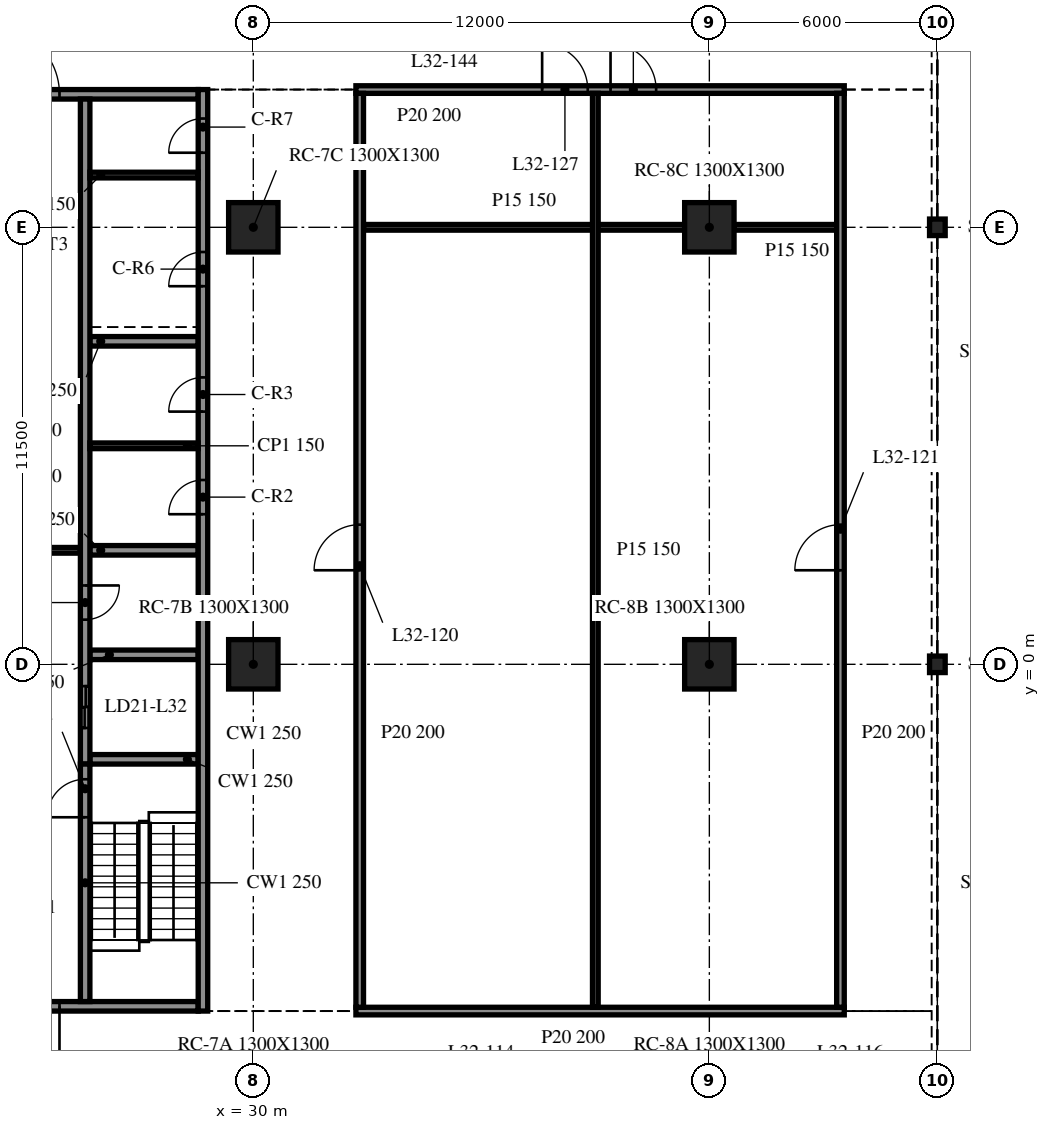
"""IFC4 building model, lengths in metres.
Left out: names, types, materials, properties, quantities, classifications, styles, units other than length and angle.
Written with IfcOpenShell. Run it as: python <this file> out.ifc"""

import sys

from ifc_helpers import new_model, si_unit, direction, frame, frame_2d, origin, origin_2d, place, context, subcontext, project, spatial, rectangle, i_section, extrude, element, fill, save


model = new_model("IFC4")
c1 = context("Model", 3, precision=1e-05, world=origin(), true_north=direction((0.0, 1.0)))
c2 = subcontext(c1, "Body", "Model", "MODEL_VIEW")
j1 = project(units=[si_unit("LENGTHUNIT", "METRE"), si_unit("PLANEANGLEUNIT", "RADIAN")], contexts=[c1])
p1 = place(None, origin())
s1 = spatial("IfcSite", under=j1, at=p1, CompositionType="ELEMENT")
p2 = place(p1, origin())
s2 = spatial("IfcBuilding", under=s1, at=p2, CompositionType="ELEMENT")
p3 = place(p2, frame((0.0, 0.0, 138.4)))
s3 = spatial("IfcBuildingStorey", under=s2, at=p3, CompositionType="ELEMENT", Elevation=138.4)
for number, where, z_axis, x_axis in (
    (1, (30.0, 0.0, -0.34), (0.0, 0.0, 1.0), (1.0, 0.0, 0.0)),
    (2, (30.0, 11.5, -0.34), (0.0, 0.0, 1.0), (1.0, 0.0, 0.0)),
    (3, (42.0, 0.0, -0.34), (0.0, 0.0, 1.0), (1.0, 0.0, 0.0)),
    (4, (42.0, 11.5, -0.34), (0.0, 0.0, 1.0), (1.0, 0.0, 0.0)),
):
    element("IfcColumn", number, at=place(p3, frame(where, z_axis=z_axis, x_axis=x_axis)), inside=s3, PredefinedType="COLUMN", context=c2, shape_type="SweptSolid", body=[
        extrude(rectangle(XDim=1.3, YDim=1.3, at=origin_2d()), origin(), (0.0, 0.0, 1.0), 4.1),
    ])
for number, where, z_axis, x_axis in (
    (5, (48.0, 0.0, -0.34), (0.0, 0.0, 1.0), (1.0, 0.0, 0.0)),
    (6, (48.0, 11.5, -0.34), (0.0, 0.0, 1.0), (1.0, 0.0, 0.0)),
):
    element("IfcColumn", number, at=place(p3, frame(where, z_axis=z_axis, x_axis=x_axis)), inside=s3, PredefinedType="COLUMN", context=c2, shape_type="SweptSolid", body=[
        extrude(i_section(OverallWidth=0.412, OverallDepth=0.434, WebThickness=0.036, FlangeThickness=0.057, at=origin_2d()), origin(), (0.0, 0.0, 1.0), 4.1),
    ])
p4 = place(p3, frame((28.675, -9.125, 0.0), z_axis=(0.0, 0.0, 1.0), x_axis=(0.0, 1.0, 0.0)))
e7 = element("IfcWall", 7, at=p4, inside=s3, PredefinedType="SOLIDWALL", context=c2, shape_type="SweptSolid", body=[
    extrude(rectangle(XDim=24.25, YDim=0.25, at=frame_2d((12.125, 0.0))), origin(), (0.0, 0.0, 1.0), 3.76),
])
p5 = place(p4, frame((13.075, 0.0, 0.0)))
e8 = element("IfcOpeningElement", 8, at=p5, cuts=e7, PredefinedType="OPENING", context=c2, shape_type="SweptSolid", body=[
    extrude(rectangle(XDim=0.9, YDim=2.1, at=frame_2d((0.45, 1.05))), frame((0.0, 0.135, 0.0), z_axis=(0.0, -1.0, 0.0), x_axis=(1.0, 0.0, 0.0)), (0.0, 0.0, 1.0), 0.27),
])
p6 = place(p4, frame((15.775, 0.0, 0.0)))
e9 = element("IfcOpeningElement", 9, at=p6, cuts=e7, PredefinedType="OPENING", context=c2, shape_type="SweptSolid", body=[
    extrude(rectangle(XDim=0.9, YDim=2.1, at=frame_2d((0.45, 1.05))), frame((0.0, 0.135, 0.0), z_axis=(0.0, -1.0, 0.0), x_axis=(1.0, 0.0, 0.0)), (0.0, 0.0, 1.0), 0.27),
])
p7 = place(p4, frame((19.075, 0.0, 0.0)))
e10 = element("IfcOpeningElement", 10, at=p7, cuts=e7, PredefinedType="OPENING", context=c2, shape_type="SweptSolid", body=[
    extrude(rectangle(XDim=0.9, YDim=2.1, at=frame_2d((0.45, 1.05))), frame((0.0, 0.135, 0.0), z_axis=(0.0, -1.0, 0.0), x_axis=(1.0, 0.0, 0.0)), (0.0, 0.0, 1.0), 0.27),
])
p8 = place(p4, frame((22.587, 0.0, 0.0)))
e11 = element("IfcOpeningElement", 11, at=p8, cuts=e7, PredefinedType="OPENING", context=c2, shape_type="SweptSolid", body=[
    extrude(rectangle(XDim=0.9, YDim=2.1, at=frame_2d((0.45, 1.05))), frame((0.0, 0.135, 0.0), z_axis=(0.0, -1.0, 0.0), x_axis=(1.0, 0.0, 0.0)), (0.0, 0.0, 1.0), 0.27),
])
p9 = place(p3, frame((28.55, -9.0, 0.0), z_axis=(0.0, 0.0, 1.0), x_axis=(-1.0, 0.0, 0.0)))
e12 = element("IfcWall", 12, at=p9, inside=s3, PredefinedType="SOLIDWALL", context=c2, shape_type="SweptSolid", body=[
    extrude(rectangle(XDim=9.1, YDim=0.25, at=frame_2d((4.55, 0.0))), origin(), (0.0, 0.0, 1.0), 3.76),
])
p10 = place(p9, frame((3.65, 0.0, 0.0)))
e13 = element("IfcOpeningElement", 13, at=p10, cuts=e12, PredefinedType="OPENING", context=c2, shape_type="SweptSolid", body=[
    extrude(rectangle(XDim=1.8, YDim=2.1, at=frame_2d((0.9, 1.05))), frame((0.0, 0.135, 0.0), z_axis=(0.0, -1.0, 0.0), x_axis=(1.0, 0.0, 0.0)), (0.0, 0.0, 1.0), 0.27),
])
p11 = place(p3, frame((19.45, 15.0, 0.0), z_axis=(0.0, 0.0, 1.0), x_axis=(1.0, 0.0, 0.0)))
e14 = element("IfcWall", 14, at=p11, inside=s3, PredefinedType="SOLIDWALL", context=c2, shape_type="SweptSolid", body=[
    extrude(rectangle(XDim=9.1, YDim=0.25, at=frame_2d((4.55, 0.0))), origin(), (0.0, 0.0, 1.0), 3.76),
])
p12 = place(p11, frame((3.65, 0.0, 0.0)))
e15 = element("IfcOpeningElement", 15, at=p12, cuts=e14, PredefinedType="OPENING", context=c2, shape_type="SweptSolid", body=[
    extrude(rectangle(XDim=1.8, YDim=2.1, at=frame_2d((0.9, 1.05))), frame((0.0, 0.135, 0.0), z_axis=(0.0, -1.0, 0.0), x_axis=(1.0, 0.0, 0.0)), (0.0, 0.0, 1.0), 0.27),
])
p13 = place(p3, frame((25.575, -8.875, 0.0), z_axis=(0.0, 0.0, 1.0), x_axis=(0.0, 1.0, 0.0)))
e16 = element("IfcWall", 16, at=p13, inside=s3, PredefinedType="SOLIDWALL", context=c2, shape_type="SweptSolid", body=[
    extrude(rectangle(XDim=6.25, YDim=0.25, at=frame_2d((3.125, 0.0))), origin(), (0.0, 0.0, 1.0), 3.76),
])
p14 = place(p13, frame((4.85, 0.0, 0.0)))
e17 = element("IfcOpeningElement", 17, at=p14, cuts=e16, PredefinedType="OPENING", context=c2, shape_type="SweptSolid", body=[
    extrude(rectangle(XDim=1.0, YDim=2.1, at=frame_2d((0.5, 1.05))), frame((0.0, 0.135, 0.0), z_axis=(0.0, -1.0, 0.0), x_axis=(1.0, 0.0, 0.0)), (0.0, 0.0, 1.0), 0.27),
])
p15 = place(p3, frame((25.575, 14.875, 0.0), z_axis=(0.0, 0.0, 1.0), x_axis=(0.0, -1.0, 0.0)))
e18 = element("IfcWall", 18, at=p15, inside=s3, PredefinedType="SOLIDWALL", context=c2, shape_type="SweptSolid", body=[
    extrude(rectangle(XDim=17.5, YDim=0.25, at=frame_2d((8.75, 0.0))), origin(), (0.0, 0.0, 1.0), 3.76),
])
p16 = place(p15, frame((15.45, 0.0, 0.0)))
e19 = element("IfcOpeningElement", 19, at=p16, cuts=e18, PredefinedType="OPENING", context=c2, shape_type="SweptSolid", body=[
    extrude(rectangle(XDim=1.1, YDim=2.1, at=frame_2d((0.55, 1.05))), frame((0.0, 0.135, 0.0), z_axis=(0.0, -1.0, 0.0), x_axis=(1.0, 0.0, 0.0)), (0.0, 0.0, 1.0), 0.27),
])
p17 = place(p15, frame((12.8, 0.0, 0.0)))
e20 = element("IfcOpeningElement", 20, at=p17, cuts=e18, PredefinedType="OPENING", context=c2, shape_type="SweptSolid", body=[
    extrude(rectangle(XDim=0.9, YDim=2.1, at=frame_2d((0.45, 1.05))), frame((0.0, 0.135, 0.0), z_axis=(0.0, -1.0, 0.0), x_axis=(1.0, 0.0, 0.0)), (0.0, 0.0, 1.0), 0.27),
])
for number, where, z_axis, x_axis in (
    (21, (25.7, -2.5, 0.0), (0.0, 0.0, 1.0), (1.0, 0.0, 0.0)),
    (22, (25.7, 0.25, 0.0), (0.0, 0.0, 1.0), (1.0, 0.0, 0.0)),
    (23, (25.7, 3.0, 0.0), (0.0, 0.0, 1.0), (1.0, 0.0, 0.0)),
    (24, (25.7, 8.5, 0.0), (0.0, 0.0, 1.0), (1.0, 0.0, 0.0)),
):
    element("IfcWall", number, at=place(p3, frame(where, z_axis=z_axis, x_axis=x_axis)), inside=s3, PredefinedType="SOLIDWALL", context=c2, shape_type="SweptSolid", body=[
        extrude(rectangle(XDim=2.85, YDim=0.25, at=frame_2d((1.425, 0.0))), origin(), (0.0, 0.0, 1.0), 3.76),
    ])
p18 = place(p3, frame((22.55, 3.0, 0.0), z_axis=(0.0, 0.0, 1.0), x_axis=(1.0, 0.0, 0.0)))
e25 = element("IfcWall", 25, at=p18, inside=s3, PredefinedType="PARTITIONING", context=c2, shape_type="SweptSolid", body=[
    extrude(rectangle(XDim=2.9, YDim=0.15, at=frame_2d((1.45, 0.0))), origin(), (0.0, 0.0, 1.0), 3.76),
])
for number, where, z_axis, x_axis in (
    (26, (25.7, 5.75, 0.0), (0.0, 0.0, 1.0), (1.0, 0.0, 0.0)),
    (27, (25.7, 12.875, 0.0), (0.0, 0.0, 1.0), (1.0, 0.0, 0.0)),
):
    element("IfcWall", number, at=place(p3, frame(where, z_axis=z_axis, x_axis=x_axis)), inside=s3, PredefinedType="PARTITIONING", context=c2, shape_type="SweptSolid", body=[
        extrude(rectangle(XDim=2.85, YDim=0.15, at=frame_2d((1.425, 0.0))), origin(), (0.0, 0.0, 1.0), 3.76),
    ])
p19 = place(p3, frame((32.7, -9.125, 0.0), z_axis=(0.0, 0.0, 1.0), x_axis=(1.0, 0.0, 0.0)))
e28 = element("IfcWall", 28, at=p19, inside=s3, PredefinedType="PARTITIONING", context=c2, shape_type="SweptSolid", body=[
    extrude(rectangle(XDim=12.85, YDim=0.2, at=frame_2d((6.425, 0.0))), origin(), (0.0, 0.0, 1.0), 3.76),
])
p20 = place(p3, frame((32.9, 11.5, 0.0), z_axis=(0.0, 0.0, 1.0), x_axis=(1.0, 0.0, 0.0)))
e29 = element("IfcWall", 29, at=p20, inside=s3, PredefinedType="PARTITIONING", context=c2, shape_type="SweptSolid", body=[
    extrude(rectangle(XDim=8.45, YDim=0.15, at=frame_2d((4.225, 0.0))), origin(), (0.0, 0.0, 1.0), 3.76),
])
p21 = place(p3, frame((42.65, 11.5, 0.0), z_axis=(0.0, 0.0, 1.0), x_axis=(1.0, 0.0, 0.0)))
e30 = element("IfcWall", 30, at=p21, inside=s3, PredefinedType="PARTITIONING", context=c2, shape_type="SweptSolid", body=[
    extrude(rectangle(XDim=2.7, YDim=0.15, at=frame_2d((1.35, 0.0))), origin(), (0.0, 0.0, 1.0), 3.76),
])
p22 = place(p3, frame((32.7, 15.125, 0.0), z_axis=(0.0, 0.0, 1.0), x_axis=(1.0, 0.0, 0.0)))
e31 = element("IfcWall", 31, at=p22, inside=s3, PredefinedType="PARTITIONING", context=c2, shape_type="SweptSolid", body=[
    extrude(rectangle(XDim=12.85, YDim=0.2, at=frame_2d((6.425, 0.0))), origin(), (0.0, 0.0, 1.0), 3.76),
])
p23 = place(p22, frame((4.9, 0.0, 0.0)))
e32 = element("IfcOpeningElement", 32, at=p23, cuts=e31, PredefinedType="OPENING", context=c2, shape_type="SweptSolid", body=[
    extrude(rectangle(XDim=1.2, YDim=2.1, at=frame_2d((0.6, 1.05))), frame((0.0, 0.11, 0.0), z_axis=(0.0, -1.0, 0.0), x_axis=(1.0, 0.0, 0.0)), (0.0, 0.0, 1.0), 0.22),
])
p24 = place(p22, frame((6.7, 0.0, 0.0)))
e33 = element("IfcOpeningElement", 33, at=p24, cuts=e31, PredefinedType="OPENING", context=c2, shape_type="SweptSolid", body=[
    extrude(rectangle(XDim=1.2, YDim=2.1, at=frame_2d((0.6, 1.05))), frame((0.0, 0.11, 0.0), z_axis=(0.0, -1.0, 0.0), x_axis=(1.0, 0.0, 0.0)), (0.0, 0.0, 1.0), 0.22),
])
p25 = place(p3, frame((32.8, -9.025, 0.0), z_axis=(0.0, 0.0, 1.0), x_axis=(0.0, 1.0, 0.0)))
e34 = element("IfcWall", 34, at=p25, inside=s3, PredefinedType="PARTITIONING", context=c2, shape_type="SweptSolid", body=[
    extrude(rectangle(XDim=24.05, YDim=0.2, at=frame_2d((12.025, 0.0))), origin(), (0.0, 0.0, 1.0), 3.76),
])
p26 = place(p25, frame((11.5, 0.0, 0.0)))
e35 = element("IfcOpeningElement", 35, at=p26, cuts=e34, PredefinedType="OPENING", context=c2, shape_type="SweptSolid", body=[
    extrude(rectangle(XDim=1.2, YDim=2.1, at=frame_2d((0.6, 1.05))), frame((0.0, 0.11, 0.0), z_axis=(0.0, -1.0, 0.0), x_axis=(1.0, 0.0, 0.0)), (0.0, 0.0, 1.0), 0.22),
])
p27 = place(p3, frame((39.0, -9.025, 0.0), z_axis=(0.0, 0.0, 1.0), x_axis=(0.0, 1.0, 0.0)))
e36 = element("IfcWall", 36, at=p27, inside=s3, PredefinedType="PARTITIONING", context=c2, shape_type="SweptSolid", body=[
    extrude(rectangle(XDim=24.05, YDim=0.15, at=frame_2d((12.025, 0.0))), origin(), (0.0, 0.0, 1.0), 3.76),
])
p28 = place(p3, frame((45.45, -9.025, 0.0), z_axis=(0.0, 0.0, 1.0), x_axis=(0.0, 1.0, 0.0)))
e37 = element("IfcWall", 37, at=p28, inside=s3, PredefinedType="PARTITIONING", context=c2, shape_type="SweptSolid", body=[
    extrude(rectangle(XDim=24.05, YDim=0.2, at=frame_2d((12.025, 0.0))), origin(), (0.0, 0.0, 1.0), 3.76),
])
p29 = place(p28, frame((11.5, 0.0, 0.0)))
e38 = element("IfcOpeningElement", 38, at=p29, cuts=e37, PredefinedType="OPENING", context=c2, shape_type="SweptSolid", body=[
    extrude(rectangle(XDim=1.2, YDim=2.1, at=frame_2d((0.6, 1.05))), frame((0.0, 0.11, 0.0), z_axis=(0.0, -1.0, 0.0), x_axis=(1.0, 0.0, 0.0)), (0.0, 0.0, 1.0), 0.22),
])
p30 = place(p10, origin())
e39 = element("IfcDoor", 39, at=p30, inside=s3, OperationType="DOUBLE_DOOR_SINGLE_SWING", PredefinedType="DOOR", context=c2, shape_type="SweptSolid", body=[
    extrude(rectangle(XDim=1.8, YDim=2.1, at=frame_2d((0.9, 1.05))), frame((0.0, 0.025, 0.0), z_axis=(0.0, -1.0, 0.0), x_axis=(1.0, 0.0, 0.0)), (0.0, 0.0, 1.0), 0.05),
])
fill(e13, e39)
p31 = place(p12, origin())
e40 = element("IfcDoor", 40, at=p31, inside=s3, OperationType="DOUBLE_DOOR_SINGLE_SWING", PredefinedType="DOOR", context=c2, shape_type="SweptSolid", body=[
    extrude(rectangle(XDim=1.8, YDim=2.1, at=frame_2d((0.9, 1.05))), frame((0.0, 0.025, 0.0), z_axis=(0.0, -1.0, 0.0), x_axis=(1.0, 0.0, 0.0)), (0.0, 0.0, 1.0), 0.05),
])
fill(e15, e40)
p32 = place(p16, origin())
e41 = element("IfcDoor", 41, at=p32, inside=s3, OperationType="DOUBLE_DOOR_SLIDING", PredefinedType="DOOR", context=c2, shape_type="SweptSolid", body=[
    extrude(rectangle(XDim=1.1, YDim=2.1, at=frame_2d((0.55, 1.05))), frame((0.0, 0.025, 0.0), z_axis=(0.0, -1.0, 0.0), x_axis=(1.0, 0.0, 0.0)), (0.0, 0.0, 1.0), 0.05),
])
fill(e19, e41)
p33 = place(p17, origin())
e42 = element("IfcDoor", 42, at=p33, inside=s3, OperationType="SINGLE_SWING_LEFT", PredefinedType="DOOR", context=c2, shape_type="SweptSolid", body=[
    extrude(rectangle(XDim=0.9, YDim=2.1, at=frame_2d((0.45, 1.05))), frame((0.0, 0.025, 0.0), z_axis=(0.0, -1.0, 0.0), x_axis=(1.0, 0.0, 0.0)), (0.0, 0.0, 1.0), 0.05),
])
fill(e20, e42)
p34 = place(p5, origin())
e43 = element("IfcDoor", 43, at=p34, inside=s3, OperationType="SINGLE_SWING_RIGHT", PredefinedType="DOOR", context=c2, shape_type="SweptSolid", body=[
    extrude(rectangle(XDim=0.9, YDim=2.1, at=frame_2d((0.45, 1.05))), frame((0.0, 0.025, 0.0), z_axis=(0.0, -1.0, 0.0), x_axis=(1.0, 0.0, 0.0)), (0.0, 0.0, 1.0), 0.05),
])
fill(e8, e43)
p35 = place(p6, origin())
e44 = element("IfcDoor", 44, at=p35, inside=s3, OperationType="SINGLE_SWING_LEFT", PredefinedType="DOOR", context=c2, shape_type="SweptSolid", body=[
    extrude(rectangle(XDim=0.9, YDim=2.1, at=frame_2d((0.45, 1.05))), frame((0.0, 0.025, 0.0), z_axis=(0.0, -1.0, 0.0), x_axis=(1.0, 0.0, 0.0)), (0.0, 0.0, 1.0), 0.05),
])
fill(e9, e44)
p36 = place(p7, origin())
e45 = element("IfcDoor", 45, at=p36, inside=s3, OperationType="SINGLE_SWING_RIGHT", PredefinedType="DOOR", context=c2, shape_type="SweptSolid", body=[
    extrude(rectangle(XDim=0.9, YDim=2.1, at=frame_2d((0.45, 1.05))), frame((0.0, 0.025, 0.0), z_axis=(0.0, -1.0, 0.0), x_axis=(1.0, 0.0, 0.0)), (0.0, 0.0, 1.0), 0.05),
])
fill(e10, e45)
p37 = place(p8, origin())
e46 = element("IfcDoor", 46, at=p37, inside=s3, OperationType="SINGLE_SWING_LEFT", PredefinedType="DOOR", context=c2, shape_type="SweptSolid", body=[
    extrude(rectangle(XDim=0.9, YDim=2.1, at=frame_2d((0.45, 1.05))), frame((0.0, 0.025, 0.0), z_axis=(0.0, -1.0, 0.0), x_axis=(1.0, 0.0, 0.0)), (0.0, 0.0, 1.0), 0.05),
])
fill(e11, e46)
p38 = place(p14, origin())
e47 = element("IfcDoor", 47, at=p38, inside=s3, OperationType="SINGLE_SWING_LEFT", PredefinedType="DOOR", context=c2, shape_type="SweptSolid", body=[
    extrude(rectangle(XDim=1.0, YDim=2.1, at=frame_2d((0.5, 1.05))), frame((0.0, 0.025, 0.0), z_axis=(0.0, -1.0, 0.0), x_axis=(1.0, 0.0, 0.0)), (0.0, 0.0, 1.0), 0.05),
])
fill(e17, e47)
p39 = place(p26, origin())
e48 = element("IfcDoor", 48, at=p39, inside=s3, OperationType="SINGLE_SWING_LEFT", PredefinedType="DOOR", context=c2, shape_type="SweptSolid", body=[
    extrude(rectangle(XDim=1.2, YDim=2.1, at=frame_2d((0.6, 1.05))), frame((0.0, 0.025, 0.0), z_axis=(0.0, -1.0, 0.0), x_axis=(1.0, 0.0, 0.0)), (0.0, 0.0, 1.0), 0.05),
])
fill(e35, e48)
p40 = place(p29, origin())
e49 = element("IfcDoor", 49, at=p40, inside=s3, OperationType="SINGLE_SWING_RIGHT", PredefinedType="DOOR", context=c2, shape_type="SweptSolid", body=[
    extrude(rectangle(XDim=1.2, YDim=2.1, at=frame_2d((0.6, 1.05))), frame((0.0, 0.025, 0.0), z_axis=(0.0, -1.0, 0.0), x_axis=(1.0, 0.0, 0.0)), (0.0, 0.0, 1.0), 0.05),
])
fill(e38, e49)
p41 = place(p23, origin())
e50 = element("IfcDoor", 50, at=p41, inside=s3, OperationType="SINGLE_SWING_RIGHT", PredefinedType="DOOR", context=c2, shape_type="SweptSolid", body=[
    extrude(rectangle(XDim=1.2, YDim=2.1, at=frame_2d((0.6, 1.05))), frame((0.0, 0.025, 0.0), z_axis=(0.0, -1.0, 0.0), x_axis=(1.0, 0.0, 0.0)), (0.0, 0.0, 1.0), 0.05),
])
fill(e32, e50)
p42 = place(p24, origin())
e51 = element("IfcDoor", 51, at=p42, inside=s3, OperationType="SINGLE_SWING_LEFT", PredefinedType="DOOR", context=c2, shape_type="SweptSolid", body=[
    extrude(rectangle(XDim=1.2, YDim=2.1, at=frame_2d((0.6, 1.05))), frame((0.0, 0.025, 0.0), z_axis=(0.0, -1.0, 0.0), x_axis=(1.0, 0.0, 0.0)), (0.0, 0.0, 1.0), 0.05),
])
fill(e33, e51)
save(model, sys.argv[1])
